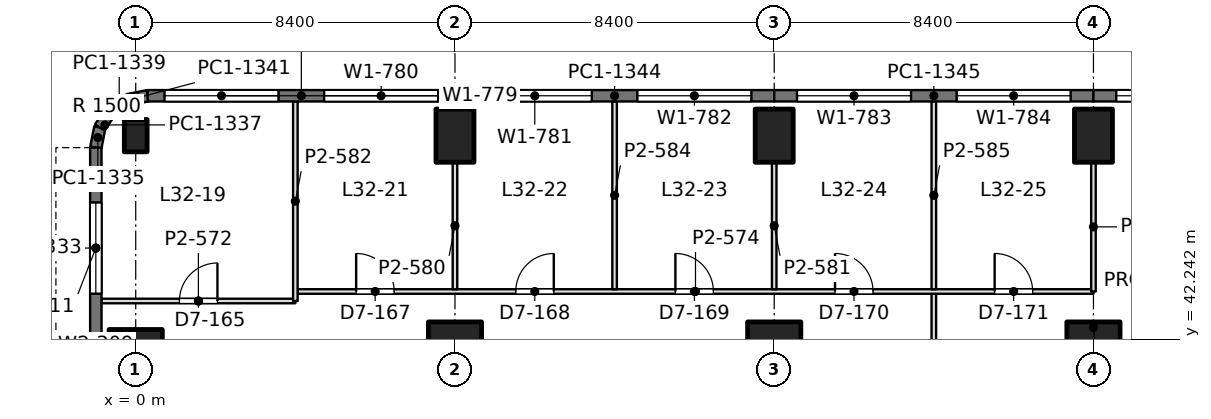
"""IFC4 building model, lengths in metres.
Left out: names, types, materials, properties, quantities, classifications, styles, units other than length and angle.
Written with IfcOpenShell. Run it as: python <this file> out.ifc"""

import sys

from ifc_helpers import new_model, si_unit, direction, frame, frame_2d, origin, origin_2d, place, context, subcontext, project, spatial, rectangle, extrude, element, fill, save


model = new_model("IFC4")
c1 = context("Model", 3, precision=1e-05, world=origin(), true_north=direction((0.0, 1.0)))
c2 = subcontext(c1, "Body", "Model", "MODEL_VIEW")
j1 = project(units=[si_unit("LENGTHUNIT", "METRE"), si_unit("PLANEANGLEUNIT", "RADIAN")], contexts=[c1])
p1 = place(None, origin())
s1 = spatial("IfcSite", under=j1, at=p1, CompositionType="ELEMENT")
p2 = place(p1, origin())
s2 = spatial("IfcBuilding", under=s1, at=p2, CompositionType="ELEMENT")
p3 = place(p2, frame((0.0, 0.0, 142.8)))
s3 = spatial("IfcBuildingStorey", under=s2, at=p3, CompositionType="ELEMENT", Elevation=142.8)
p4 = place(p3, frame((0.0, 42.0, 0.0), z_axis=(0.0, 0.0, 1.0), x_axis=(0.0, 1.0, 0.0)))
e1 = element("IfcColumn", 1, at=p4, inside=s3, PredefinedType="COLUMN", context=c2, shape_type="SweptSolid", body=[
    extrude(rectangle(XDim=1.0, YDim=1.4, at=origin_2d()), origin(), (0.0, 0.0, 1.0), 4.2),
])
p5 = place(p3, frame((0.0, 47.6, 0.0), z_axis=(0.0, 0.0, 1.0), x_axis=(1.0, 0.0, 0.0)))
e2 = element("IfcColumn", 2, at=p5, inside=s3, PredefinedType="COLUMN", context=c2, shape_type="SweptSolid", body=[
    extrude(rectangle(XDim=0.6, YDim=0.85, at=origin_2d()), origin(), (0.0, 0.0, 1.0), 4.2),
])
p6 = place(p3, frame((8.4, 42.0, 0.0), z_axis=(0.0, 0.0, 1.0), x_axis=(1.0, 0.0, 0.0)))
e3 = element("IfcColumn", 3, at=p6, inside=s3, PredefinedType="COLUMN", context=c2, shape_type="SweptSolid", body=[
    extrude(rectangle(XDim=1.4, YDim=1.4, at=origin_2d()), origin(), (0.0, 0.0, 1.0), 4.2),
])
p7 = place(p3, frame((8.4, 47.6, 0.0), z_axis=(0.0, 0.0, 1.0), x_axis=(1.0, 0.0, 0.0)))
e4 = element("IfcColumn", 4, at=p7, inside=s3, PredefinedType="COLUMN", context=c2, shape_type="SweptSolid", body=[
    extrude(rectangle(XDim=1.0, YDim=1.4, at=origin_2d()), origin(), (0.0, 0.0, 1.0), 4.2),
])
p8 = place(p3, frame((16.8, 42.0, 0.0), z_axis=(0.0, 0.0, 1.0), x_axis=(1.0, 0.0, 0.0)))
e5 = element("IfcColumn", 5, at=p8, inside=s3, PredefinedType="COLUMN", context=c2, shape_type="SweptSolid", body=[
    extrude(rectangle(XDim=1.4, YDim=1.4, at=origin_2d()), origin(), (0.0, 0.0, 1.0), 4.2),
])
p9 = place(p3, frame((16.8, 47.6, 0.0), z_axis=(0.0, 0.0, 1.0), x_axis=(1.0, 0.0, 0.0)))
e6 = element("IfcColumn", 6, at=p9, inside=s3, PredefinedType="COLUMN", context=c2, shape_type="SweptSolid", body=[
    extrude(rectangle(XDim=1.0, YDim=1.4, at=origin_2d()), origin(), (0.0, 0.0, 1.0), 4.2),
])
p10 = place(p3, frame((25.2, 42.0, 0.0), z_axis=(0.0, 0.0, 1.0), x_axis=(1.0, 0.0, 0.0)))
e7 = element("IfcColumn", 7, at=p10, inside=s3, PredefinedType="COLUMN", context=c2, shape_type="SweptSolid", body=[
    extrude(rectangle(XDim=1.4, YDim=1.4, at=origin_2d()), origin(), (0.0, 0.0, 1.0), 4.2),
])
p11 = place(p3, frame((25.2, 47.6, 0.0), z_axis=(0.0, 0.0, 1.0), x_axis=(1.0, 0.0, 0.0)))
e8 = element("IfcColumn", 8, at=p11, inside=s3, PredefinedType="COLUMN", context=c2, shape_type="SweptSolid", body=[
    extrude(rectangle(XDim=1.0, YDim=1.4, at=origin_2d()), origin(), (0.0, 0.0, 1.0), 4.2),
])
p12 = place(p3, frame((-1.05, 42.0, 0.0), z_axis=(0.0, 0.0, 1.0), x_axis=(0.0, 1.0, 0.0)))
e9 = element("IfcWall", 9, at=p12, inside=s3, PredefinedType="SOLIDWALL", context=c2, shape_type="SweptSolid", body=[
    extrude(rectangle(XDim=5.285, YDim=0.3, at=frame_2d((2.643, 0.0))), origin(), (0.0, 0.0, 1.0), 4.05),
])
p13 = place(p12, frame((1.443, 0.0, 0.9)))
e10 = element("IfcOpeningElement", 10, at=p13, cuts=e9, PredefinedType="OPENING", context=c2, shape_type="SweptSolid", body=[
    extrude(rectangle(XDim=2.4, YDim=1.9, at=frame_2d((1.2, 0.95))), frame((0.0, 0.16, 0.0), z_axis=(0.0, -1.0, 0.0), x_axis=(1.0, 0.0, 0.0)), (0.0, 0.0, 1.0), 0.32),
])
p14 = place(p3, frame((-1.05, 47.285, 0.0), z_axis=(0.0, 0.0, 1.0), x_axis=(0.195073962632, 0.980788534345, 0.0)))
e11 = element("IfcWall", 11, at=p14, inside=s3, PredefinedType="SOLIDWALL", context=c2, shape_type="SweptSolid", body=[
    extrude(rectangle(XDim=0.541, YDim=0.3, at=frame_2d((0.271, 0.0))), origin(), (0.0, 0.0, 1.0), 4.05),
])
p15 = place(p3, frame((-0.945, 47.815, 0.0), z_axis=(0.0, 0.0, 1.0), x_axis=(0.55534295404, 0.831621430339, 0.0)))
e12 = element("IfcWall", 12, at=p15, inside=s3, PredefinedType="SOLIDWALL", context=c2, shape_type="SweptSolid", body=[
    extrude(rectangle(XDim=0.526, YDim=0.3, at=frame_2d((0.263, 0.0))), origin(), (0.0, 0.0, 1.0), 4.05),
])
p16 = place(p3, frame((-0.653, 48.253, 0.0), z_axis=(0.0, 0.0, 1.0), x_axis=(0.831692711774, 0.555236195849, 0.0)))
e13 = element("IfcWall", 13, at=p16, inside=s3, PredefinedType="SOLIDWALL", context=c2, shape_type="SweptSolid", body=[
    extrude(rectangle(XDim=0.525, YDim=0.3, at=frame_2d((0.263, 0.0))), origin(), (0.0, 0.0, 1.0), 4.05),
])
p17 = place(p3, frame((-0.216, 48.544, 0.0), z_axis=(0.0, 0.0, 1.0), x_axis=(0.980788534345, 0.195073962632, 0.0)))
e14 = element("IfcWall", 14, at=p17, inside=s3, PredefinedType="SOLIDWALL", context=c2, shape_type="SweptSolid", body=[
    extrude(rectangle(XDim=0.541, YDim=0.3, at=frame_2d((0.271, 0.0))), origin(), (0.0, 0.0, 1.0), 4.05),
])
p18 = place(p3, frame((0.315, 48.65, 0.0), z_axis=(0.0, 0.0, 1.0), x_axis=(1.0, 0.0, 0.0)))
e15 = element("IfcWall", 15, at=p18, inside=s3, PredefinedType="SOLIDWALL", context=c2, shape_type="SweptSolid", body=[
    extrude(rectangle(XDim=8.085, YDim=0.3, at=frame_2d((4.042, 0.0))), origin(), (0.0, 0.0, 1.0), 4.05),
])
p19 = place(p18, frame((0.443, 0.0, 0.9)))
e16 = element("IfcOpeningElement", 16, at=p19, cuts=e15, PredefinedType="OPENING", context=c2, shape_type="SweptSolid", body=[
    extrude(rectangle(XDim=3.0, YDim=1.9, at=frame_2d((1.5, 0.95))), frame((0.0, 0.16, 0.0), z_axis=(0.0, -1.0, 0.0), x_axis=(1.0, 0.0, 0.0)), (0.0, 0.0, 1.0), 0.32),
])
p20 = place(p18, frame((4.643, 0.0, 0.9)))
e17 = element("IfcOpeningElement", 17, at=p20, cuts=e15, PredefinedType="OPENING", context=c2, shape_type="SweptSolid", body=[
    extrude(rectangle(XDim=3.0, YDim=1.9, at=frame_2d((1.5, 0.95))), frame((0.0, 0.16, 0.0), z_axis=(0.0, -1.0, 0.0), x_axis=(1.0, 0.0, 0.0)), (0.0, 0.0, 1.0), 0.32),
])
p21 = place(p3, frame((8.4, 48.65, 0.0), z_axis=(0.0, 0.0, 1.0), x_axis=(1.0, 0.0, 0.0)))
e18 = element("IfcWall", 18, at=p21, inside=s3, PredefinedType="SOLIDWALL", context=c2, shape_type="SweptSolid", body=[
    extrude(rectangle(XDim=8.4, YDim=0.3, at=frame_2d((4.2, 0.0))), origin(), (0.0, 0.0, 1.0), 4.05),
])
p22 = place(p21, frame((0.6, 0.0, 0.9)))
e19 = element("IfcOpeningElement", 19, at=p22, cuts=e18, PredefinedType="OPENING", context=c2, shape_type="SweptSolid", body=[
    extrude(rectangle(XDim=3.0, YDim=1.9, at=frame_2d((1.5, 0.95))), frame((0.0, 0.16, 0.0), z_axis=(0.0, -1.0, 0.0), x_axis=(1.0, 0.0, 0.0)), (0.0, 0.0, 1.0), 0.32),
])
p23 = place(p21, frame((4.8, 0.0, 0.9)))
e20 = element("IfcOpeningElement", 20, at=p23, cuts=e18, PredefinedType="OPENING", context=c2, shape_type="SweptSolid", body=[
    extrude(rectangle(XDim=3.0, YDim=1.9, at=frame_2d((1.5, 0.95))), frame((0.0, 0.16, 0.0), z_axis=(0.0, -1.0, 0.0), x_axis=(1.0, 0.0, 0.0)), (0.0, 0.0, 1.0), 0.32),
])
p24 = place(p3, frame((16.8, 48.65, 0.0), z_axis=(0.0, 0.0, 1.0), x_axis=(1.0, 0.0, 0.0)))
e21 = element("IfcWall", 21, at=p24, inside=s3, PredefinedType="SOLIDWALL", context=c2, shape_type="SweptSolid", body=[
    extrude(rectangle(XDim=8.4, YDim=0.3, at=frame_2d((4.2, 0.0))), origin(), (0.0, 0.0, 1.0), 4.05),
])
p25 = place(p24, frame((0.6, 0.0, 0.9)))
e22 = element("IfcOpeningElement", 22, at=p25, cuts=e21, PredefinedType="OPENING", context=c2, shape_type="SweptSolid", body=[
    extrude(rectangle(XDim=3.0, YDim=1.9, at=frame_2d((1.5, 0.95))), frame((0.0, 0.16, 0.0), z_axis=(0.0, -1.0, 0.0), x_axis=(1.0, 0.0, 0.0)), (0.0, 0.0, 1.0), 0.32),
])
p26 = place(p24, frame((4.8, 0.0, 0.9)))
e23 = element("IfcOpeningElement", 23, at=p26, cuts=e21, PredefinedType="OPENING", context=c2, shape_type="SweptSolid", body=[
    extrude(rectangle(XDim=3.0, YDim=1.9, at=frame_2d((1.5, 0.95))), frame((0.0, 0.16, 0.0), z_axis=(0.0, -1.0, 0.0), x_axis=(1.0, 0.0, 0.0)), (0.0, 0.0, 1.0), 0.32),
])
p27 = place(p3, frame((25.2, 48.65, 0.0), z_axis=(0.0, 0.0, 1.0), x_axis=(1.0, 0.0, 0.0)))
e24 = element("IfcWall", 24, at=p27, inside=s3, PredefinedType="SOLIDWALL", context=c2, shape_type="SweptSolid", body=[
    extrude(rectangle(XDim=8.4, YDim=0.3, at=frame_2d((4.2, 0.0))), origin(), (0.0, 0.0, 1.0), 4.05),
])
p28 = place(p27, frame((0.6, 0.0, 0.9)))
e25 = element("IfcOpeningElement", 25, at=p28, cuts=e24, PredefinedType="OPENING", context=c2, shape_type="SweptSolid", body=[
    extrude(rectangle(XDim=3.0, YDim=1.9, at=frame_2d((1.5, 0.95))), frame((0.0, 0.16, 0.0), z_axis=(0.0, -1.0, 0.0), x_axis=(1.0, 0.0, 0.0)), (0.0, 0.0, 1.0), 0.32),
])
p29 = place(p27, frame((4.8, 0.0, 0.9)))
e26 = element("IfcOpeningElement", 26, at=p29, cuts=e24, PredefinedType="OPENING", context=c2, shape_type="SweptSolid", body=[
    extrude(rectangle(XDim=3.0, YDim=1.9, at=frame_2d((1.5, 0.95))), frame((0.0, 0.16, 0.0), z_axis=(0.0, -1.0, 0.0), x_axis=(1.0, 0.0, 0.0)), (0.0, 0.0, 1.0), 0.32),
])
p30 = place(p3, frame((-0.902, 43.25, 0.0), z_axis=(0.0, 0.0, 1.0), x_axis=(1.0, 0.0, 0.0)))
e27 = element("IfcWall", 27, at=p30, inside=s3, PredefinedType="PARTITIONING", context=c2, shape_type="SweptSolid", body=[
    extrude(rectangle(XDim=5.102, YDim=0.12, at=frame_2d((2.551, 0.0))), origin(), (0.0, 0.0, 1.0), 3.56),
])
p31 = place(p30, frame((2.052, 0.0, 0.0)))
e28 = element("IfcOpeningElement", 28, at=p31, cuts=e27, PredefinedType="OPENING", context=c2, shape_type="SweptSolid", body=[
    extrude(rectangle(XDim=1.0, YDim=2.4, at=frame_2d((0.5, 1.2))), frame((0.0, 0.07, 0.0), z_axis=(0.0, -1.0, 0.0), x_axis=(1.0, 0.0, 0.0)), (0.0, 0.0, 1.0), 0.14),
])
p32 = place(p3, frame((4.258, 43.5, 0.0), z_axis=(0.0, 0.0, 1.0), x_axis=(1.0, 0.0, 0.0)))
e29 = element("IfcWall", 29, at=p32, inside=s3, PredefinedType="PARTITIONING", context=c2, shape_type="SweptSolid", body=[
    extrude(rectangle(XDim=20.942, YDim=0.12, at=frame_2d((10.471, 0.0))), origin(), (0.0, 0.0, 1.0), 3.55),
])
p33 = place(p32, frame((1.542, 0.0, 0.0)))
e30 = element("IfcOpeningElement", 30, at=p33, cuts=e29, PredefinedType="OPENING", context=c2, shape_type="SweptSolid", body=[
    extrude(rectangle(XDim=1.0, YDim=2.4, at=frame_2d((0.5, 1.2))), frame((0.0, 0.07, 0.0), z_axis=(0.0, -1.0, 0.0), x_axis=(1.0, 0.0, 0.0)), (0.0, 0.0, 1.0), 0.14),
])
p34 = place(p32, frame((5.742, 0.0, 0.0)))
e31 = element("IfcOpeningElement", 31, at=p34, cuts=e29, PredefinedType="OPENING", context=c2, shape_type="SweptSolid", body=[
    extrude(rectangle(XDim=1.0, YDim=2.4, at=frame_2d((0.5, 1.2))), frame((0.0, 0.07, 0.0), z_axis=(0.0, -1.0, 0.0), x_axis=(1.0, 0.0, 0.0)), (0.0, 0.0, 1.0), 0.14),
])
p35 = place(p32, frame((9.942, 0.0, 0.0)))
e32 = element("IfcOpeningElement", 32, at=p35, cuts=e29, PredefinedType="OPENING", context=c2, shape_type="SweptSolid", body=[
    extrude(rectangle(XDim=1.0, YDim=2.4, at=frame_2d((0.5, 1.2))), frame((0.0, 0.07, 0.0), z_axis=(0.0, -1.0, 0.0), x_axis=(1.0, 0.0, 0.0)), (0.0, 0.0, 1.0), 0.14),
])
p36 = place(p32, frame((14.142, 0.0, 0.0)))
e33 = element("IfcOpeningElement", 33, at=p36, cuts=e29, PredefinedType="OPENING", context=c2, shape_type="SweptSolid", body=[
    extrude(rectangle(XDim=1.0, YDim=2.4, at=frame_2d((0.5, 1.2))), frame((0.0, 0.07, 0.0), z_axis=(0.0, -1.0, 0.0), x_axis=(1.0, 0.0, 0.0)), (0.0, 0.0, 1.0), 0.14),
])
p37 = place(p32, frame((18.342, 0.0, 0.0)))
e34 = element("IfcOpeningElement", 34, at=p37, cuts=e29, PredefinedType="OPENING", context=c2, shape_type="SweptSolid", body=[
    extrude(rectangle(XDim=1.0, YDim=2.4, at=frame_2d((0.5, 1.2))), frame((0.0, 0.07, 0.0), z_axis=(0.0, -1.0, 0.0), x_axis=(1.0, 0.0, 0.0)), (0.0, 0.0, 1.0), 0.14),
])
p38 = place(p3, frame((4.2, 43.25, 0.0), z_axis=(0.0, 0.0, 1.0), x_axis=(0.0, 1.0, 0.0)))
e35 = element("IfcWall", 35, at=p38, inside=s3, PredefinedType="PARTITIONING", context=c2, shape_type="SweptSolid", body=[
    extrude(rectangle(XDim=5.252, YDim=0.12, at=frame_2d((2.626, 0.0))), origin(), (0.0, 0.0, 1.0), 3.56),
])
p39 = place(p3, frame((8.4, 43.558, 0.0), z_axis=(0.0, 0.0, 1.0), x_axis=(0.0, 1.0, 0.0)))
e36 = element("IfcWall", 36, at=p39, inside=s3, PredefinedType="PARTITIONING", context=c2, shape_type="SweptSolid", body=[
    extrude(rectangle(XDim=3.343, YDim=0.12, at=frame_2d((1.671, 0.0))), origin(), (0.0, 0.0, 1.0), 3.55),
])
p40 = place(p3, frame((12.6, 43.558, 0.0), z_axis=(0.0, 0.0, 1.0), x_axis=(0.0, 1.0, 0.0)))
e37 = element("IfcWall", 37, at=p40, inside=s3, PredefinedType="PARTITIONING", context=c2, shape_type="SweptSolid", body=[
    extrude(rectangle(XDim=4.944, YDim=0.12, at=frame_2d((2.472, 0.0))), origin(), (0.0, 0.0, 1.0), 3.56),
])
p41 = place(p3, frame((16.8, 43.558, 0.0), z_axis=(0.0, 0.0, 1.0), x_axis=(0.0, 1.0, 0.0)))
e38 = element("IfcWall", 38, at=p41, inside=s3, PredefinedType="PARTITIONING", context=c2, shape_type="SweptSolid", body=[
    extrude(rectangle(XDim=3.343, YDim=0.12, at=frame_2d((1.671, 0.0))), origin(), (0.0, 0.0, 1.0), 3.55),
])
p42 = place(p3, frame((21.0, 43.558, 0.0), z_axis=(0.0, 0.0, 1.0), x_axis=(0.0, 1.0, 0.0)))
e39 = element("IfcWall", 39, at=p42, inside=s3, PredefinedType="PARTITIONING", context=c2, shape_type="SweptSolid", body=[
    extrude(rectangle(XDim=4.944, YDim=0.12, at=frame_2d((2.472, 0.0))), origin(), (0.0, 0.0, 1.0), 3.56),
])
p43 = place(p3, frame((25.2, 43.5, 0.0), z_axis=(0.0, 0.0, 1.0), x_axis=(0.0, 1.0, 0.0)))
e40 = element("IfcWall", 40, at=p43, inside=s3, PredefinedType="PARTITIONING", context=c2, shape_type="SweptSolid", body=[
    extrude(rectangle(XDim=3.401, YDim=0.12, at=frame_2d((1.7, 0.0))), origin(), (0.0, 0.0, 1.0), 3.55),
])
p44 = place(p3, frame((21.0, 37.858, 0.0), z_axis=(0.0, 0.0, 1.0), x_axis=(0.0, 1.0, 0.0)))
e41 = element("IfcWall", 41, at=p44, inside=s3, PredefinedType="PARTITIONING", context=c2, shape_type="SweptSolid", body=[
    extrude(rectangle(XDim=5.584, YDim=0.12, at=frame_2d((2.792, 0.0))), origin(), (0.0, 0.0, 1.0), 3.55),
])
p45 = place(p13, origin())
e42 = element("IfcWindow", 42, at=p45, inside=s3, PartitioningType="SINGLE_PANEL", PredefinedType="WINDOW", context=c2, shape_type="SweptSolid", body=[
    extrude(rectangle(XDim=2.4, YDim=1.9, at=frame_2d((1.2, 0.95))), frame((0.0, 0.03, 0.0), z_axis=(0.0, -1.0, 0.0), x_axis=(1.0, 0.0, 0.0)), (0.0, 0.0, 1.0), 0.06),
])
fill(e10, e42)
p46 = place(p19, origin())
e43 = element("IfcWindow", 43, at=p46, inside=s3, PartitioningType="SINGLE_PANEL", PredefinedType="WINDOW", context=c2, shape_type="SweptSolid", body=[
    extrude(rectangle(XDim=3.0, YDim=1.9, at=frame_2d((1.5, 0.95))), frame((0.0, 0.03, 0.0), z_axis=(0.0, -1.0, 0.0), x_axis=(1.0, 0.0, 0.0)), (0.0, 0.0, 1.0), 0.06),
])
fill(e16, e43)
p47 = place(p20, origin())
e44 = element("IfcWindow", 44, at=p47, inside=s3, PartitioningType="SINGLE_PANEL", PredefinedType="WINDOW", context=c2, shape_type="SweptSolid", body=[
    extrude(rectangle(XDim=3.0, YDim=1.9, at=frame_2d((1.5, 0.95))), frame((0.0, 0.03, 0.0), z_axis=(0.0, -1.0, 0.0), x_axis=(1.0, 0.0, 0.0)), (0.0, 0.0, 1.0), 0.06),
])
fill(e17, e44)
p48 = place(p22, origin())
e45 = element("IfcWindow", 45, at=p48, inside=s3, PartitioningType="SINGLE_PANEL", PredefinedType="WINDOW", context=c2, shape_type="SweptSolid", body=[
    extrude(rectangle(XDim=3.0, YDim=1.9, at=frame_2d((1.5, 0.95))), frame((0.0, 0.03, 0.0), z_axis=(0.0, -1.0, 0.0), x_axis=(1.0, 0.0, 0.0)), (0.0, 0.0, 1.0), 0.06),
])
fill(e19, e45)
p49 = place(p23, origin())
e46 = element("IfcWindow", 46, at=p49, inside=s3, PartitioningType="SINGLE_PANEL", PredefinedType="WINDOW", context=c2, shape_type="SweptSolid", body=[
    extrude(rectangle(XDim=3.0, YDim=1.9, at=frame_2d((1.5, 0.95))), frame((0.0, 0.03, 0.0), z_axis=(0.0, -1.0, 0.0), x_axis=(1.0, 0.0, 0.0)), (0.0, 0.0, 1.0), 0.06),
])
fill(e20, e46)
p50 = place(p25, origin())
e47 = element("IfcWindow", 47, at=p50, inside=s3, PartitioningType="SINGLE_PANEL", PredefinedType="WINDOW", context=c2, shape_type="SweptSolid", body=[
    extrude(rectangle(XDim=3.0, YDim=1.9, at=frame_2d((1.5, 0.95))), frame((0.0, 0.03, 0.0), z_axis=(0.0, -1.0, 0.0), x_axis=(1.0, 0.0, 0.0)), (0.0, 0.0, 1.0), 0.06),
])
fill(e22, e47)
p51 = place(p26, origin())
e48 = element("IfcWindow", 48, at=p51, inside=s3, PartitioningType="SINGLE_PANEL", PredefinedType="WINDOW", context=c2, shape_type="SweptSolid", body=[
    extrude(rectangle(XDim=3.0, YDim=1.9, at=frame_2d((1.5, 0.95))), frame((0.0, 0.03, 0.0), z_axis=(0.0, -1.0, 0.0), x_axis=(1.0, 0.0, 0.0)), (0.0, 0.0, 1.0), 0.06),
])
fill(e23, e48)
p52 = place(p28, origin())
e49 = element("IfcWindow", 49, at=p52, inside=s3, PartitioningType="SINGLE_PANEL", PredefinedType="WINDOW", context=c2, shape_type="SweptSolid", body=[
    extrude(rectangle(XDim=3.0, YDim=1.9, at=frame_2d((1.5, 0.95))), frame((0.0, 0.03, 0.0), z_axis=(0.0, -1.0, 0.0), x_axis=(1.0, 0.0, 0.0)), (0.0, 0.0, 1.0), 0.06),
])
fill(e25, e49)
p53 = place(p31, origin())
e50 = element("IfcDoor", 50, at=p53, inside=s3, OperationType="SINGLE_SWING_RIGHT", PredefinedType="DOOR", context=c2, shape_type="SweptSolid", body=[
    extrude(rectangle(XDim=1.0, YDim=2.4, at=frame_2d((0.5, 1.2))), frame((0.0, 0.025, 0.0), z_axis=(0.0, -1.0, 0.0), x_axis=(1.0, 0.0, 0.0)), (0.0, 0.0, 1.0), 0.05),
])
fill(e28, e50)
p54 = place(p33, origin())
e51 = element("IfcDoor", 51, at=p54, inside=s3, OperationType="SINGLE_SWING_LEFT", PredefinedType="DOOR", context=c2, shape_type="SweptSolid", body=[
    extrude(rectangle(XDim=1.0, YDim=2.4, at=frame_2d((0.5, 1.2))), frame((0.0, 0.025, 0.0), z_axis=(0.0, -1.0, 0.0), x_axis=(1.0, 0.0, 0.0)), (0.0, 0.0, 1.0), 0.05),
])
fill(e30, e51)
p55 = place(p34, origin())
e52 = element("IfcDoor", 52, at=p55, inside=s3, OperationType="SINGLE_SWING_RIGHT", PredefinedType="DOOR", context=c2, shape_type="SweptSolid", body=[
    extrude(rectangle(XDim=1.0, YDim=2.4, at=frame_2d((0.5, 1.2))), frame((0.0, 0.025, 0.0), z_axis=(0.0, -1.0, 0.0), x_axis=(1.0, 0.0, 0.0)), (0.0, 0.0, 1.0), 0.05),
])
fill(e31, e52)
p56 = place(p35, origin())
e53 = element("IfcDoor", 53, at=p56, inside=s3, OperationType="SINGLE_SWING_LEFT", PredefinedType="DOOR", context=c2, shape_type="SweptSolid", body=[
    extrude(rectangle(XDim=1.0, YDim=2.4, at=frame_2d((0.5, 1.2))), frame((0.0, 0.025, 0.0), z_axis=(0.0, -1.0, 0.0), x_axis=(1.0, 0.0, 0.0)), (0.0, 0.0, 1.0), 0.05),
])
fill(e32, e53)
p57 = place(p36, origin())
e54 = element("IfcDoor", 54, at=p57, inside=s3, OperationType="SINGLE_SWING_LEFT", PredefinedType="DOOR", context=c2, shape_type="SweptSolid", body=[
    extrude(rectangle(XDim=1.0, YDim=2.4, at=frame_2d((0.5, 1.2))), frame((0.0, 0.025, 0.0), z_axis=(0.0, -1.0, 0.0), x_axis=(1.0, 0.0, 0.0)), (0.0, 0.0, 1.0), 0.05),
])
fill(e33, e54)
p58 = place(p37, origin())
e55 = element("IfcDoor", 55, at=p58, inside=s3, OperationType="SINGLE_SWING_LEFT", PredefinedType="DOOR", context=c2, shape_type="SweptSolid", body=[
    extrude(rectangle(XDim=1.0, YDim=2.4, at=frame_2d((0.5, 1.2))), frame((0.0, 0.025, 0.0), z_axis=(0.0, -1.0, 0.0), x_axis=(1.0, 0.0, 0.0)), (0.0, 0.0, 1.0), 0.05),
])
fill(e34, e55)
save(model, sys.argv[1])
